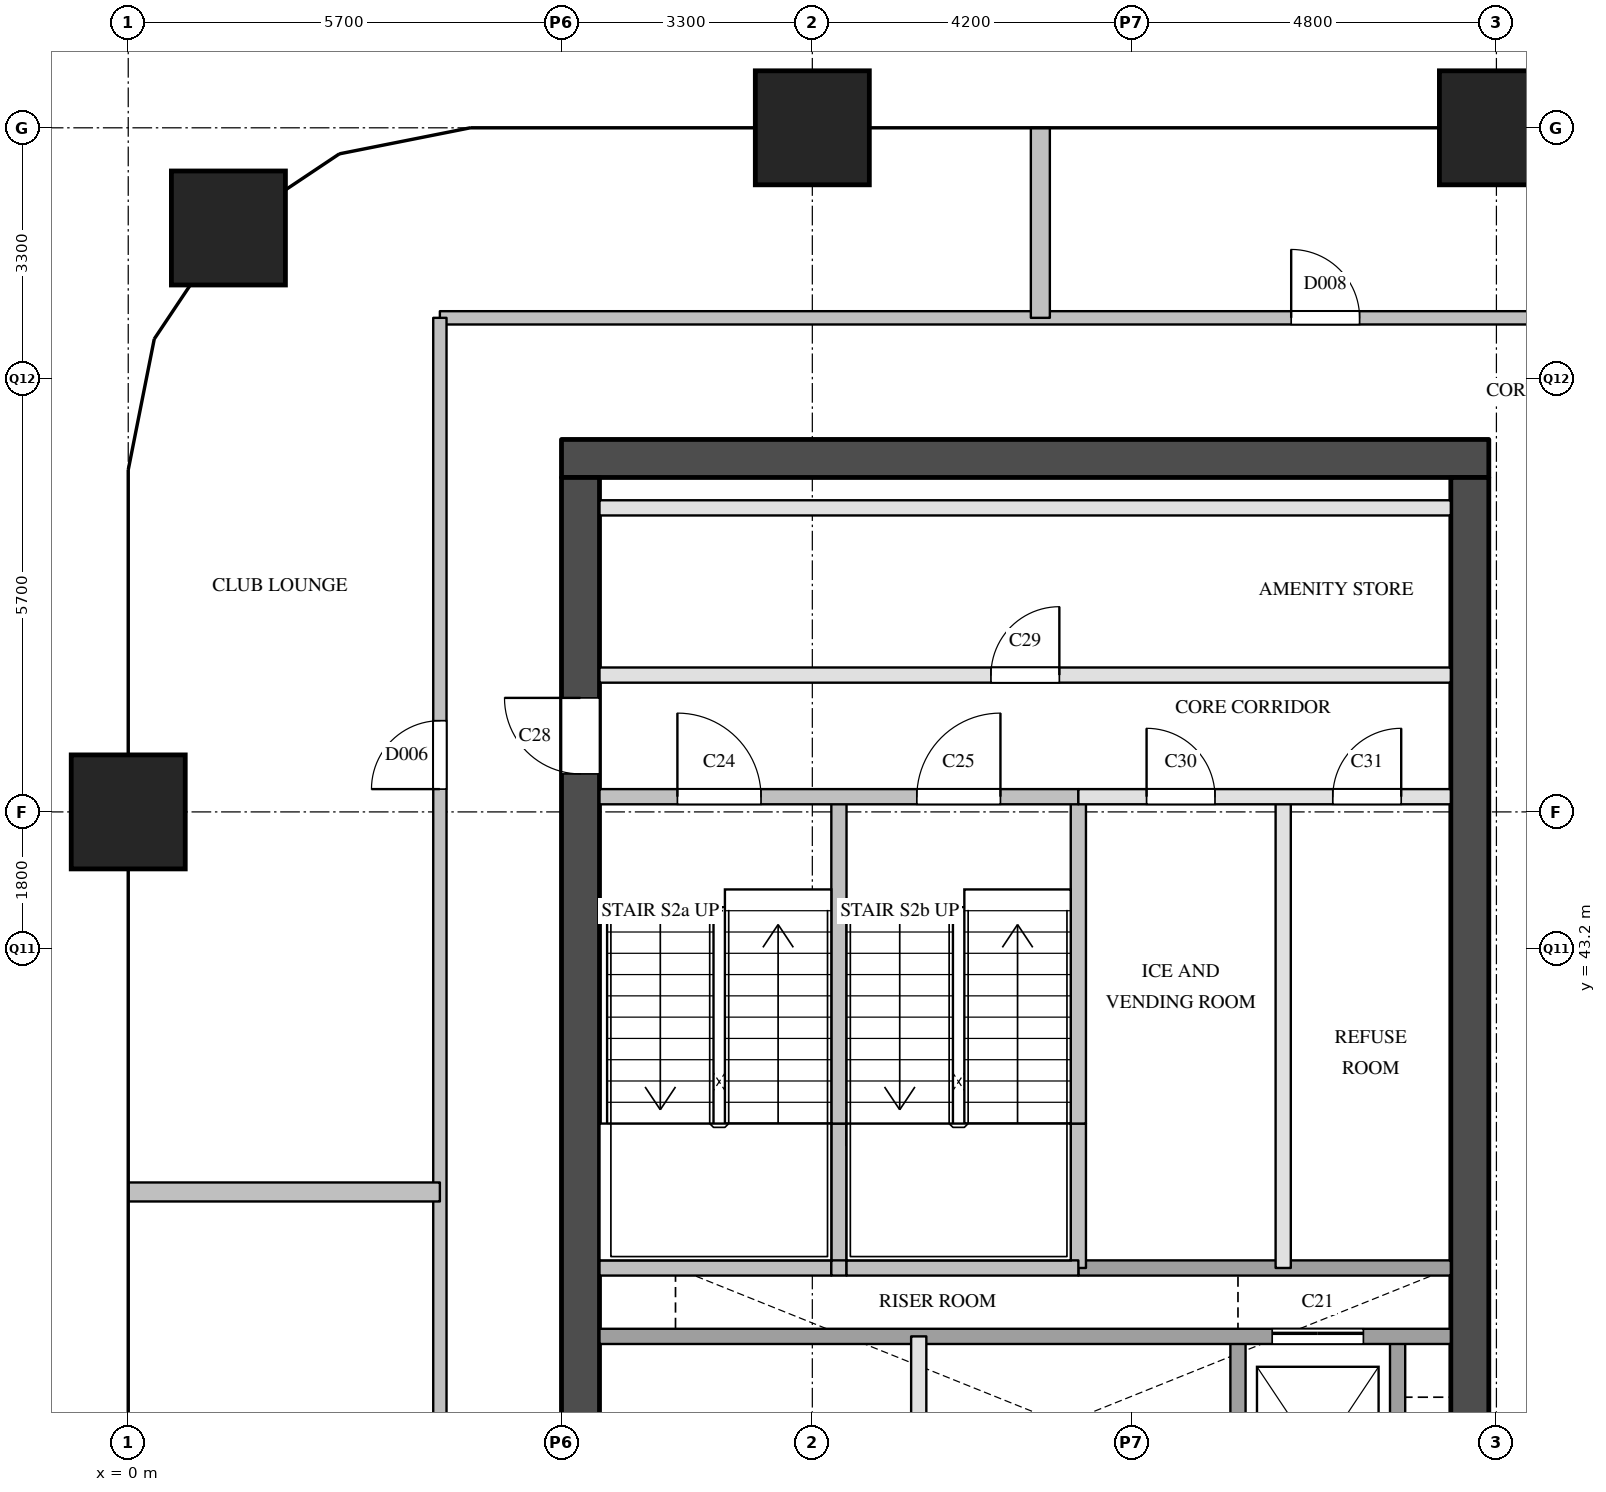
"""IFC4 building model, lengths in metres.
Left out: names, types, materials, properties, quantities, classifications, styles, units other than length and angle.
Written with IfcOpenShell. Run it as: python <this file> out.ifc"""

import sys

from ifc_helpers import new_model, si_unit, direction, frame, frame_2d, origin, origin_2d, place, context, subcontext, project, spatial, rectangle, extrude, element, fill, save


model = new_model("IFC4")
c1 = context("Model", 3, precision=1e-05, world=origin(), true_north=direction((0.0, 1.0)))
c2 = subcontext(c1, "Body", "Model", "MODEL_VIEW")
j1 = project(units=[si_unit("LENGTHUNIT", "METRE"), si_unit("PLANEANGLEUNIT", "RADIAN")], contexts=[c1])
p1 = place(None, origin())
s1 = spatial("IfcSite", under=j1, at=p1, CompositionType="ELEMENT")
p2 = place(p1, origin())
s2 = spatial("IfcBuilding", under=s1, at=p2, CompositionType="ELEMENT")
p3 = place(p2, frame((0.0, 0.0, 138.8)))
s3 = spatial("IfcBuildingStorey", under=s2, at=p3, CompositionType="ELEMENT", Elevation=138.8)
for number, where, z_axis, x_axis in (
    (1, (0.0, 45.0, 0.0), (0.0, 0.0, 1.0), (1.0, 0.0, 0.0)),
    (2, (1.318, 52.682, 0.0), (0.0, 0.0, 1.0), (1.0, 0.0, 0.0)),
    (3, (9.0, 54.0, 0.0), (0.0, 0.0, 1.0), (1.0, 0.0, 0.0)),
    (4, (18.0, 54.0, 0.0), (0.0, 0.0, 1.0), (1.0, 0.0, 0.0)),
):
    element("IfcColumn", number, at=place(p3, frame(where, z_axis=z_axis, x_axis=x_axis)), inside=s3, PredefinedType="COLUMN", context=c2, shape_type="SweptSolid", body=[
        extrude(rectangle(XDim=1.5, YDim=1.5, at=origin_2d()), origin(), (0.0, 0.0, 1.0), 3.9),
    ])
p4 = place(p3, frame((5.7, 49.65, 0.0), z_axis=(0.0, 0.0, 1.0), x_axis=(1.0, 0.0, 0.0)))
e5 = element("IfcWall", 5, at=p4, inside=s3, PredefinedType="SHEAR", context=c2, shape_type="SweptSolid", body=[
    extrude(rectangle(XDim=12.2, YDim=0.5, at=frame_2d((6.1, 0.0))), origin(), (0.0, 0.0, 1.0), 3.6),
])
p5 = place(p3, frame((5.95, 29.1, 0.0), z_axis=(0.0, 0.0, 1.0), x_axis=(0.0, 1.0, 0.0)))
e6 = element("IfcWall", 6, at=p5, inside=s3, PredefinedType="SHEAR", context=c2, shape_type="SweptSolid", body=[
    extrude(rectangle(XDim=20.3, YDim=0.5, at=frame_2d((10.15, 0.0))), origin(), (0.0, 0.0, 1.0), 3.6),
])
p6 = place(p5, frame((3.45, 0.0, 0.0)))
e7 = element("IfcOpeningElement", 7, at=p6, cuts=e6, PredefinedType="OPENING", context=c2, shape_type="SweptSolid", body=[
    extrude(rectangle(XDim=1.0, YDim=2.1, at=frame_2d((0.5, 1.05))), frame((0.0, 0.26, 0.0), z_axis=(0.0, -1.0, 0.0), x_axis=(1.0, 0.0, 0.0)), (0.0, 0.0, 1.0), 0.52),
])
p7 = place(p5, frame((16.4, 0.0, 0.0)))
e8 = element("IfcOpeningElement", 8, at=p7, cuts=e6, PredefinedType="OPENING", context=c2, shape_type="SweptSolid", body=[
    extrude(rectangle(XDim=1.0, YDim=2.1, at=frame_2d((0.5, 1.05))), frame((0.0, 0.26, 0.0), z_axis=(0.0, -1.0, 0.0), x_axis=(1.0, 0.0, 0.0)), (0.0, 0.0, 1.0), 0.52),
])
p8 = place(p3, frame((17.65, 29.1, 0.0), z_axis=(0.0, 0.0, 1.0), x_axis=(0.0, 1.0, 0.0)))
e9 = element("IfcWall", 9, at=p8, inside=s3, PredefinedType="SHEAR", context=c2, shape_type="SweptSolid", body=[
    extrude(rectangle(XDim=20.3, YDim=0.5, at=frame_2d((10.15, 0.0))), origin(), (0.0, 0.0, 1.0), 3.6),
])
p9 = place(p8, frame((1.25, 0.0, 0.0)))
e10 = element("IfcOpeningElement", 10, at=p9, cuts=e9, PredefinedType="OPENING", context=c2, shape_type="SweptSolid", body=[
    extrude(rectangle(XDim=0.7, YDim=2.1, at=frame_2d((0.35, 1.05))), frame((0.0, 0.26, 0.0), z_axis=(0.0, -1.0, 0.0), x_axis=(1.0, 0.0, 0.0)), (0.0, 0.0, 1.0), 0.52),
])
p10 = place(p8, frame((7.05, 0.0, 0.0)))
e11 = element("IfcOpeningElement", 11, at=p10, cuts=e9, PredefinedType="OPENING", context=c2, shape_type="SweptSolid", body=[
    extrude(rectangle(XDim=0.7, YDim=2.1, at=frame_2d((0.35, 1.05))), frame((0.0, 0.26, 0.0), z_axis=(0.0, -1.0, 0.0), x_axis=(1.0, 0.0, 0.0)), (0.0, 0.0, 1.0), 0.52),
])
p11 = place(p8, frame((3.6, 0.0, 0.0)))
e12 = element("IfcOpeningElement", 12, at=p11, cuts=e9, PredefinedType="OPENING", context=c2, shape_type="SweptSolid", body=[
    extrude(rectangle(XDim=1.8, YDim=2.1, at=frame_2d((0.9, 1.05))), frame((0.0, 0.26, 0.0), z_axis=(0.0, -1.0, 0.0), x_axis=(1.0, 0.0, 0.0)), (0.0, 0.0, 1.0), 0.52),
])
p12 = place(p3, frame((9.35, 39.0, 0.0), z_axis=(0.0, 0.0, 1.0), x_axis=(0.0, 1.0, 0.0)))
e13 = element("IfcWall", 13, at=p12, inside=s3, PredefinedType="SOLIDWALL", context=c2, shape_type="SweptSolid", body=[
    extrude(rectangle(XDim=1.9, YDim=0.2, at=frame_2d((0.95, 0.0))), origin(), (0.0, 0.0, 1.0), 3.6),
])
p13 = place(p3, frame((9.35, 40.9, 0.0), z_axis=(0.0, 0.0, 1.0), x_axis=(0.0, 1.0, 0.0)))
e14 = element("IfcWall", 14, at=p13, inside=s3, PredefinedType="SOLIDWALL", context=c2, shape_type="SweptSolid", body=[
    extrude(rectangle(XDim=4.3, YDim=0.2, at=frame_2d((2.15, 0.0))), origin(), (0.0, 0.0, 1.0), 3.6),
])
p14 = place(p3, frame((10.4, 33.8, 0.0), z_axis=(0.0, 0.0, 1.0), x_axis=(0.0, 1.0, 0.0)))
e15 = element("IfcWall", 15, at=p14, inside=s3, PredefinedType="PARTITIONING", context=c2, shape_type="SweptSolid", body=[
    extrude(rectangle(XDim=4.3, YDim=0.2, at=frame_2d((2.15, 0.0))), origin(), (0.0, 0.0, 1.0), 3.6),
])
p15 = place(p3, frame((12.5, 39.0, 0.0), z_axis=(0.0, 0.0, 1.0), x_axis=(0.0, 1.0, 0.0)))
e16 = element("IfcWall", 16, at=p15, inside=s3, PredefinedType="SOLIDWALL", context=c2, shape_type="SweptSolid", body=[
    extrude(rectangle(XDim=1.9, YDim=0.2, at=frame_2d((0.95, 0.0))), origin(), (0.0, 0.0, 1.0), 3.6),
])
p16 = place(p3, frame((12.5, 40.9, 0.0), z_axis=(0.0, 0.0, 1.0), x_axis=(0.0, 1.0, 0.0)))
e17 = element("IfcWall", 17, at=p16, inside=s3, PredefinedType="SOLIDWALL", context=c2, shape_type="SweptSolid", body=[
    extrude(rectangle(XDim=4.3, YDim=0.2, at=frame_2d((2.15, 0.0))), origin(), (0.0, 0.0, 1.0), 3.6),
])
p17 = place(p3, frame((14.6, 34.9, 0.0), z_axis=(0.0, 0.0, 1.0), x_axis=(0.0, 1.0, 0.0)))
e18 = element("IfcWall", 18, at=p17, inside=s3, PredefinedType="SOLIDWALL", context=c2, shape_type="SweptSolid", body=[
    extrude(rectangle(XDim=3.2, YDim=0.2, at=frame_2d((1.6, 0.0))), origin(), (0.0, 0.0, 1.0), 3.6),
])
p18 = place(p3, frame((15.195, 39.0, 0.0), z_axis=(0.0, 0.0, 1.0), x_axis=(0.0, 1.0, 0.0)))
e19 = element("IfcWall", 19, at=p18, inside=s3, PredefinedType="PARTITIONING", context=c2, shape_type="SweptSolid", body=[
    extrude(rectangle(XDim=6.2, YDim=0.2, at=frame_2d((3.1, 0.0))), origin(), (0.0, 0.0, 1.0), 3.6),
])
p19 = place(p3, frame((16.7, 34.9, 0.0), z_axis=(0.0, 0.0, 1.0), x_axis=(0.0, 1.0, 0.0)))
e20 = element("IfcWall", 20, at=p19, inside=s3, PredefinedType="SOLIDWALL", context=c2, shape_type="SweptSolid", body=[
    extrude(rectangle(XDim=3.2, YDim=0.2, at=frame_2d((1.6, 0.0))), origin(), (0.0, 0.0, 1.0), 3.6),
])
p20 = place(p3, frame((6.2, 38.1, 0.0), z_axis=(0.0, 0.0, 1.0), x_axis=(1.0, 0.0, 0.0)))
e21 = element("IfcWall", 21, at=p20, inside=s3, PredefinedType="SOLIDWALL", context=c2, shape_type="SweptSolid", body=[
    extrude(rectangle(XDim=11.2, YDim=0.2, at=frame_2d((5.6, 0.0))), origin(), (0.0, 0.0, 1.0), 3.6),
])
p21 = place(p20, frame((8.85, 0.0, 0.0)))
e22 = element("IfcOpeningElement", 22, at=p21, cuts=e21, PredefinedType="OPENING", context=c2, shape_type="SweptSolid", body=[
    extrude(rectangle(XDim=1.2, YDim=2.1, at=frame_2d((0.6, 1.05))), frame((0.0, 0.11, 0.0), z_axis=(0.0, -1.0, 0.0), x_axis=(1.0, 0.0, 0.0)), (0.0, 0.0, 1.0), 0.22),
])
p22 = place(p3, frame((12.5, 39.0, 0.0), z_axis=(0.0, 0.0, 1.0), x_axis=(1.0, 0.0, 0.0)))
e23 = element("IfcWall", 23, at=p22, inside=s3, PredefinedType="SOLIDWALL", context=c2, shape_type="SweptSolid", body=[
    extrude(rectangle(XDim=4.9, YDim=0.2, at=frame_2d((2.45, 0.0))), origin(), (0.0, 0.0, 1.0), 3.6),
])
p23 = place(p3, frame((6.2, 39.0, 0.0), z_axis=(0.0, 0.0, 1.0), x_axis=(1.0, 0.0, 0.0)))
e24 = element("IfcWall", 24, at=p23, inside=s3, PredefinedType="SOLIDWALL", context=c2, shape_type="SweptSolid", body=[
    extrude(rectangle(XDim=3.05, YDim=0.2, at=frame_2d((1.525, 0.0))), origin(), (0.0, 0.0, 1.0), 3.6),
])
p24 = place(p3, frame((9.25, 39.0, 0.0), z_axis=(0.0, 0.0, 1.0), x_axis=(1.0, 0.0, 0.0)))
e25 = element("IfcWall", 25, at=p24, inside=s3, PredefinedType="SOLIDWALL", context=c2, shape_type="SweptSolid", body=[
    extrude(rectangle(XDim=0.2, YDim=0.2, at=frame_2d((0.1, 0.0))), origin(), (0.0, 0.0, 1.0), 3.6),
])
p25 = place(p3, frame((9.45, 39.0, 0.0), z_axis=(0.0, 0.0, 1.0), x_axis=(1.0, 0.0, 0.0)))
e26 = element("IfcWall", 26, at=p25, inside=s3, PredefinedType="SOLIDWALL", context=c2, shape_type="SweptSolid", body=[
    extrude(rectangle(XDim=3.05, YDim=0.2, at=frame_2d((1.525, 0.0))), origin(), (0.0, 0.0, 1.0), 3.6),
])
p26 = place(p3, frame((12.5, 45.2, 0.0), z_axis=(0.0, 0.0, 1.0), x_axis=(1.0, 0.0, 0.0)))
e27 = element("IfcWall", 27, at=p26, inside=s3, PredefinedType="PARTITIONING", context=c2, shape_type="SweptSolid", body=[
    extrude(rectangle(XDim=4.9, YDim=0.2, at=frame_2d((2.45, 0.0))), origin(), (0.0, 0.0, 1.0), 3.6),
])
p27 = place(p26, frame((0.897, 0.0, 0.0)))
e28 = element("IfcOpeningElement", 28, at=p27, cuts=e27, PredefinedType="OPENING", context=c2, shape_type="SweptSolid", body=[
    extrude(rectangle(XDim=0.9, YDim=2.1, at=frame_2d((0.45, 1.05))), frame((0.0, 0.11, 0.0), z_axis=(0.0, -1.0, 0.0), x_axis=(1.0, 0.0, 0.0)), (0.0, 0.0, 1.0), 0.22),
])
p28 = place(p26, frame((3.347, 0.0, 0.0)))
e29 = element("IfcOpeningElement", 29, at=p28, cuts=e27, PredefinedType="OPENING", context=c2, shape_type="SweptSolid", body=[
    extrude(rectangle(XDim=0.9, YDim=2.1, at=frame_2d((0.45, 1.05))), frame((0.0, 0.11, 0.0), z_axis=(0.0, -1.0, 0.0), x_axis=(1.0, 0.0, 0.0)), (0.0, 0.0, 1.0), 0.22),
])
p29 = place(p3, frame((6.2, 45.2, 0.0), z_axis=(0.0, 0.0, 1.0), x_axis=(1.0, 0.0, 0.0)))
e30 = element("IfcWall", 30, at=p29, inside=s3, PredefinedType="SOLIDWALL", context=c2, shape_type="SweptSolid", body=[
    extrude(rectangle(XDim=6.3, YDim=0.2, at=frame_2d((3.15, 0.0))), origin(), (0.0, 0.0, 1.0), 3.6),
])
p30 = place(p29, frame((1.025, 0.0, 0.0)))
e31 = element("IfcOpeningElement", 31, at=p30, cuts=e30, PredefinedType="OPENING", context=c2, shape_type="SweptSolid", body=[
    extrude(rectangle(XDim=1.1, YDim=2.1, at=frame_2d((0.55, 1.05))), frame((0.0, 0.11, 0.0), z_axis=(0.0, -1.0, 0.0), x_axis=(1.0, 0.0, 0.0)), (0.0, 0.0, 1.0), 0.22),
])
p31 = place(p29, frame((4.175, 0.0, 0.0)))
e32 = element("IfcOpeningElement", 32, at=p31, cuts=e30, PredefinedType="OPENING", context=c2, shape_type="SweptSolid", body=[
    extrude(rectangle(XDim=1.1, YDim=2.1, at=frame_2d((0.55, 1.05))), frame((0.0, 0.11, 0.0), z_axis=(0.0, -1.0, 0.0), x_axis=(1.0, 0.0, 0.0)), (0.0, 0.0, 1.0), 0.22),
])
p32 = place(p3, frame((6.2, 46.8, 0.0), z_axis=(0.0, 0.0, 1.0), x_axis=(1.0, 0.0, 0.0)))
e33 = element("IfcWall", 33, at=p32, inside=s3, PredefinedType="PARTITIONING", context=c2, shape_type="SweptSolid", body=[
    extrude(rectangle(XDim=11.2, YDim=0.2, at=frame_2d((5.6, 0.0))), origin(), (0.0, 0.0, 1.0), 3.6),
])
p33 = place(p32, frame((5.15, 0.0, 0.0)))
e34 = element("IfcOpeningElement", 34, at=p33, cuts=e33, PredefinedType="OPENING", context=c2, shape_type="SweptSolid", body=[
    extrude(rectangle(XDim=0.9, YDim=2.1, at=frame_2d((0.45, 1.05))), frame((0.0, 0.11, 0.0), z_axis=(0.0, -1.0, 0.0), x_axis=(1.0, 0.0, 0.0)), (0.0, 0.0, 1.0), 0.22),
])
p34 = place(p3, frame((6.2, 49.0, 0.0), z_axis=(0.0, 0.0, 1.0), x_axis=(1.0, 0.0, 0.0)))
e35 = element("IfcWall", 35, at=p34, inside=s3, PredefinedType="PARTITIONING", context=c2, shape_type="SweptSolid", body=[
    extrude(rectangle(XDim=11.2, YDim=0.2, at=frame_2d((5.6, 0.0))), origin(), (0.0, 0.0, 1.0), 3.6),
])
p35 = place(p3, frame((4.1, 51.5, 0.0), z_axis=(0.0, 0.0, 1.0), x_axis=(1.0, 0.0, 0.0)))
e36 = element("IfcWall", 36, at=p35, inside=s3, PredefinedType="PARTITIONING", context=c2, shape_type="SweptSolid", body=[
    extrude(rectangle(XDim=15.4, YDim=0.175, at=frame_2d((7.7, 0.0))), origin(), (0.0, 0.0, 1.0), 3.6),
])
p36 = place(p35, frame((11.2, 0.0, 0.0)))
e37 = element("IfcOpeningElement", 37, at=p36, cuts=e36, PredefinedType="OPENING", context=c2, shape_type="SweptSolid", body=[
    extrude(rectangle(XDim=0.9, YDim=2.1, at=frame_2d((0.45, 1.05))), frame((0.0, 0.097, 0.0), z_axis=(0.0, -1.0, 0.0), x_axis=(1.0, 0.0, 0.0)), (0.0, 0.0, 1.0), 0.195),
])
p37 = place(p3, frame((4.1, 28.5, 0.0), z_axis=(0.0, 0.0, 1.0), x_axis=(0.0, 1.0, 0.0)))
e38 = element("IfcWall", 38, at=p37, inside=s3, PredefinedType="PARTITIONING", context=c2, shape_type="SweptSolid", body=[
    extrude(rectangle(XDim=23.0, YDim=0.175, at=frame_2d((11.5, 0.0))), origin(), (0.0, 0.0, 1.0), 3.6),
])
p38 = place(p37, frame((5.3, 0.0, 0.0)))
e39 = element("IfcOpeningElement", 39, at=p38, cuts=e38, PredefinedType="OPENING", context=c2, shape_type="SweptSolid", body=[
    extrude(rectangle(XDim=0.9, YDim=2.1, at=frame_2d((0.45, 1.05))), frame((0.0, 0.097, 0.0), z_axis=(0.0, -1.0, 0.0), x_axis=(1.0, 0.0, 0.0)), (0.0, 0.0, 1.0), 0.195),
])
p39 = place(p37, frame((16.8, 0.0, 0.0)))
e40 = element("IfcOpeningElement", 40, at=p39, cuts=e38, PredefinedType="OPENING", context=c2, shape_type="SweptSolid", body=[
    extrude(rectangle(XDim=0.9, YDim=2.1, at=frame_2d((0.45, 1.05))), frame((0.0, 0.097, 0.0), z_axis=(0.0, -1.0, 0.0), x_axis=(1.0, 0.0, 0.0)), (0.0, 0.0, 1.0), 0.195),
])
p40 = place(p3, frame((0.0, 40.0, 0.0), z_axis=(0.0, 0.0, 1.0), x_axis=(1.0, 0.0, 0.0)))
e41 = element("IfcWall", 41, at=p40, inside=s3, PredefinedType="PARTITIONING", context=c2, shape_type="SweptSolid", body=[
    extrude(rectangle(XDim=4.1, YDim=0.25, at=frame_2d((2.05, 0.0))), origin(), (0.0, 0.0, 1.0), 2.6),
])
p41 = place(p3, frame((12.0, 51.5, 0.0), z_axis=(0.0, 0.0, 1.0), x_axis=(0.0, 1.0, 0.0)))
e42 = element("IfcWall", 42, at=p41, inside=s3, PredefinedType="PARTITIONING", context=c2, shape_type="SweptSolid", body=[
    extrude(rectangle(XDim=2.5, YDim=0.25, at=frame_2d((1.25, 0.0))), origin(), (0.0, 0.0, 1.0), 2.6),
])
p42 = place(p21, origin())
e43 = element("IfcDoor", 43, at=p42, inside=s3, OperationType="SLIDING_TO_LEFT", PredefinedType="DOOR", context=c2, shape_type="SweptSolid", body=[
    extrude(rectangle(XDim=1.2, YDim=2.1, at=frame_2d((0.6, 1.05))), frame((0.0, 0.025, 0.0), z_axis=(0.0, -1.0, 0.0), x_axis=(1.0, 0.0, 0.0)), (0.0, 0.0, 1.0), 0.05),
])
fill(e22, e43)
p43 = place(p30, origin())
e44 = element("IfcDoor", 44, at=p43, inside=s3, OperationType="SINGLE_SWING_LEFT", PredefinedType="DOOR", context=c2, shape_type="SweptSolid", body=[
    extrude(rectangle(XDim=1.1, YDim=2.1, at=frame_2d((0.55, 1.05))), frame((0.0, 0.025, 0.0), z_axis=(0.0, -1.0, 0.0), x_axis=(1.0, 0.0, 0.0)), (0.0, 0.0, 1.0), 0.05),
])
fill(e31, e44)
p44 = place(p31, origin())
e45 = element("IfcDoor", 45, at=p44, inside=s3, OperationType="SINGLE_SWING_RIGHT", PredefinedType="DOOR", context=c2, shape_type="SweptSolid", body=[
    extrude(rectangle(XDim=1.1, YDim=2.1, at=frame_2d((0.55, 1.05))), frame((0.0, 0.025, 0.0), z_axis=(0.0, -1.0, 0.0), x_axis=(1.0, 0.0, 0.0)), (0.0, 0.0, 1.0), 0.05),
])
fill(e32, e45)
p45 = place(p7, origin())
e46 = element("IfcDoor", 46, at=p45, inside=s3, OperationType="SINGLE_SWING_RIGHT", PredefinedType="DOOR", context=c2, shape_type="SweptSolid", body=[
    extrude(rectangle(XDim=1.0, YDim=2.1, at=frame_2d((0.5, 1.05))), frame((0.0, 0.025, 0.0), z_axis=(0.0, -1.0, 0.0), x_axis=(1.0, 0.0, 0.0)), (0.0, 0.0, 1.0), 0.05),
])
fill(e8, e46)
p46 = place(p33, origin())
e47 = element("IfcDoor", 47, at=p46, inside=s3, OperationType="SINGLE_SWING_RIGHT", PredefinedType="DOOR", context=c2, shape_type="SweptSolid", body=[
    extrude(rectangle(XDim=0.9, YDim=2.1, at=frame_2d((0.45, 1.05))), frame((0.0, 0.025, 0.0), z_axis=(0.0, -1.0, 0.0), x_axis=(1.0, 0.0, 0.0)), (0.0, 0.0, 1.0), 0.05),
])
fill(e34, e47)
p47 = place(p27, origin())
e48 = element("IfcDoor", 48, at=p47, inside=s3, OperationType="SINGLE_SWING_LEFT", PredefinedType="DOOR", context=c2, shape_type="SweptSolid", body=[
    extrude(rectangle(XDim=0.9, YDim=2.1, at=frame_2d((0.45, 1.05))), frame((0.0, 0.025, 0.0), z_axis=(0.0, -1.0, 0.0), x_axis=(1.0, 0.0, 0.0)), (0.0, 0.0, 1.0), 0.05),
])
fill(e28, e48)
p48 = place(p28, origin())
e49 = element("IfcDoor", 49, at=p48, inside=s3, OperationType="SINGLE_SWING_RIGHT", PredefinedType="DOOR", context=c2, shape_type="SweptSolid", body=[
    extrude(rectangle(XDim=0.9, YDim=2.1, at=frame_2d((0.45, 1.05))), frame((0.0, 0.025, 0.0), z_axis=(0.0, -1.0, 0.0), x_axis=(1.0, 0.0, 0.0)), (0.0, 0.0, 1.0), 0.05),
])
fill(e29, e49)
p49 = place(p39, origin())
e50 = element("IfcDoor", 50, at=p49, inside=s3, OperationType="SINGLE_SWING_LEFT", PredefinedType="DOOR", context=c2, shape_type="SweptSolid", body=[
    extrude(rectangle(XDim=0.9, YDim=2.1, at=frame_2d((0.45, 1.05))), frame((0.0, 0.025, 0.0), z_axis=(0.0, -1.0, 0.0), x_axis=(1.0, 0.0, 0.0)), (0.0, 0.0, 1.0), 0.05),
])
fill(e40, e50)
p50 = place(p36, origin())
e51 = element("IfcDoor", 51, at=p50, inside=s3, OperationType="SINGLE_SWING_LEFT", PredefinedType="DOOR", context=c2, shape_type="SweptSolid", body=[
    extrude(rectangle(XDim=0.9, YDim=2.1, at=frame_2d((0.45, 1.05))), frame((0.0, 0.025, 0.0), z_axis=(0.0, -1.0, 0.0), x_axis=(1.0, 0.0, 0.0)), (0.0, 0.0, 1.0), 0.05),
])
fill(e37, e51)
save(model, sys.argv[1])
